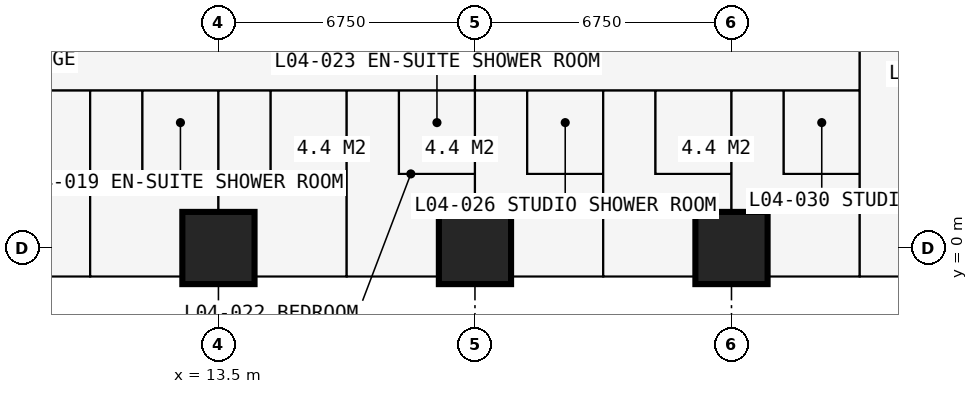
"""IFC4 building model, lengths in metres.
Left out: names, types, materials, properties, quantities, classifications, styles, units other than length and angle.
Written with IfcOpenShell. Run it as: python <this file> out.ifc"""

import sys

from ifc_helpers import new_model, si_unit, direction, frame, frame_2d, origin, origin_2d, place, context, subcontext, project, spatial, rectangle, extrude, element, fill, save


model = new_model("IFC4")
c1 = context("Model", 3, precision=1e-05, world=origin(), true_north=direction((0.0, 1.0)))
c2 = subcontext(c1, "Body", "Model", "MODEL_VIEW")
j1 = project(units=[si_unit("LENGTHUNIT", "METRE"), si_unit("PLANEANGLEUNIT", "RADIAN")], contexts=[c1])
p1 = place(None, origin())
s1 = spatial("IfcSite", under=j1, at=p1, CompositionType="ELEMENT")
p2 = place(p1, origin())
s2 = spatial("IfcBuilding", under=s1, at=p2, CompositionType="ELEMENT")
p3 = place(p2, frame((0.0, 0.0, 18.0)))
s3 = spatial("IfcBuildingStorey", under=s2, at=p3, CompositionType="ELEMENT", Elevation=18.0)
for number, where, z_axis, x_axis in (
    (1, (13.5, 0.0, 0.0), (0.0, 0.0, 1.0), (1.0, 0.0, 0.0)),
    (2, (20.25, 0.0, 0.0), (0.0, 0.0, 1.0), (1.0, 0.0, 0.0)),
    (3, (27.0, 0.0, 0.0), (0.0, 0.0, 1.0), (1.0, 0.0, 0.0)),
):
    element("IfcColumn", number, at=place(p3, frame(where, z_axis=z_axis, x_axis=x_axis)), inside=s3, PredefinedType="COLUMN", context=c2, shape_type="SweptSolid", body=[
        extrude(rectangle(XDim=1.9, YDim=1.9, at=origin_2d()), origin(), (0.0, 0.0, 1.0), 3.6),
    ])
p4 = place(p3, frame((20.25, -0.75, 0.0), z_axis=(0.0, 0.0, 1.0), x_axis=(-1.0, 0.0, 0.0)))
e4 = element("IfcWall", 4, at=p4, inside=s3, PredefinedType="SOLIDWALL", context=c2, shape_type="SweptSolid", body=[
    extrude(rectangle(XDim=6.75, YDim=0.15, at=frame_2d((3.375, 0.0))), origin(), (0.0, 0.0, 1.0), 3.375),
])
p5 = place(p4, frame((0.996, 0.0, 0.0)))
e5 = element("IfcOpeningElement", 5, at=p5, cuts=e4, PredefinedType="OPENING", context=c2, shape_type="SweptSolid", body=[
    extrude(rectangle(XDim=1.0, YDim=2.2, at=frame_2d((0.5, 1.1))), frame((0.0, 0.085, 0.0), z_axis=(0.0, -1.0, 0.0), x_axis=(1.0, 0.0, 0.0)), (0.0, 0.0, 1.0), 0.17),
])
p6 = place(p4, frame((2.042, 0.0, 0.9)))
e6 = element("IfcOpeningElement", 6, at=p6, cuts=e4, PredefinedType="OPENING", context=c2, shape_type="SweptSolid", body=[
    extrude(rectangle(XDim=1.2, YDim=1.8, at=frame_2d((0.6, 0.9))), frame((0.0, 0.085, 0.0), z_axis=(0.0, -1.0, 0.0), x_axis=(1.0, 0.0, 0.0)), (0.0, 0.0, 1.0), 0.17),
])
p7 = place(p4, frame((4.754, 0.0, 0.0)))
e7 = element("IfcOpeningElement", 7, at=p7, cuts=e4, PredefinedType="OPENING", context=c2, shape_type="SweptSolid", body=[
    extrude(rectangle(XDim=1.0, YDim=2.2, at=frame_2d((0.5, 1.1))), frame((0.0, 0.085, 0.0), z_axis=(0.0, -1.0, 0.0), x_axis=(1.0, 0.0, 0.0)), (0.0, 0.0, 1.0), 0.17),
])
p8 = place(p4, frame((3.508, 0.0, 0.9)))
e8 = element("IfcOpeningElement", 8, at=p8, cuts=e4, PredefinedType="OPENING", context=c2, shape_type="SweptSolid", body=[
    extrude(rectangle(XDim=1.2, YDim=1.8, at=frame_2d((0.6, 0.9))), frame((0.0, 0.085, 0.0), z_axis=(0.0, -1.0, 0.0), x_axis=(1.0, 0.0, 0.0)), (0.0, 0.0, 1.0), 0.17),
])
p9 = place(p3, frame((16.875, -0.85, 0.0), z_axis=(0.0, 0.0, 1.0), x_axis=(0.0, -1.0, 0.0)))
e9 = element("IfcWall", 9, at=p9, inside=s3, PredefinedType="USERDEFINED", context=c2, shape_type="SweptSolid", body=[
    extrude(rectangle(XDim=2.2, YDim=1.0, at=frame_2d((1.1, 0.0))), origin(), (0.0, 0.0, 1.0), 0.9),
])
p10 = place(p3, frame((6.75, 4.15, 0.0), z_axis=(0.0, 0.0, 1.0), x_axis=(1.0, 0.0, 0.0)))
e10 = element("IfcWall", 10, at=p10, inside=s3, PredefinedType="PARTITIONING", context=c2, shape_type="SweptSolid", body=[
    extrude(rectangle(XDim=23.625, YDim=0.1, at=frame_2d((11.812, 0.0))), origin(), (0.0, 0.0, 1.0), 3.375),
])
p11 = place(p10, frame((1.2, 0.0, 0.0)))
e11 = element("IfcOpeningElement", 11, at=p11, cuts=e10, PredefinedType="OPENING", context=c2, shape_type="SweptSolid", body=[
    extrude(rectangle(XDim=1.0, YDim=2.2, at=frame_2d((0.5, 1.1))), frame((0.0, 0.06, 0.0), z_axis=(0.0, -1.0, 0.0), x_axis=(1.0, 0.0, 0.0)), (0.0, 0.0, 1.0), 0.12),
])
p12 = place(p10, frame((3.575, 0.0, 0.0)))
e12 = element("IfcOpeningElement", 12, at=p12, cuts=e10, PredefinedType="OPENING", context=c2, shape_type="SweptSolid", body=[
    extrude(rectangle(XDim=0.95, YDim=2.2, at=frame_2d((0.475, 1.1))), frame((0.0, 0.06, 0.0), z_axis=(0.0, -1.0, 0.0), x_axis=(1.0, 0.0, 0.0)), (0.0, 0.0, 1.0), 0.12),
])
p13 = place(p10, frame((7.0, 0.0, 0.0)))
e13 = element("IfcOpeningElement", 13, at=p13, cuts=e10, PredefinedType="OPENING", context=c2, shape_type="SweptSolid", body=[
    extrude(rectangle(XDim=0.95, YDim=2.2, at=frame_2d((0.475, 1.1))), frame((0.0, 0.06, 0.0), z_axis=(0.0, -1.0, 0.0), x_axis=(1.0, 0.0, 0.0)), (0.0, 0.0, 1.0), 0.12),
])
p14 = place(p10, frame((10.375, 0.0, 0.0)))
e14 = element("IfcOpeningElement", 14, at=p14, cuts=e10, PredefinedType="OPENING", context=c2, shape_type="SweptSolid", body=[
    extrude(rectangle(XDim=0.95, YDim=2.2, at=frame_2d((0.475, 1.1))), frame((0.0, 0.06, 0.0), z_axis=(0.0, -1.0, 0.0), x_axis=(1.0, 0.0, 0.0)), (0.0, 0.0, 1.0), 0.12),
])
p15 = place(p10, frame((13.7, 0.0, 0.0)))
e15 = element("IfcOpeningElement", 15, at=p15, cuts=e10, PredefinedType="OPENING", context=c2, shape_type="SweptSolid", body=[
    extrude(rectangle(XDim=0.95, YDim=2.2, at=frame_2d((0.475, 1.1))), frame((0.0, 0.06, 0.0), z_axis=(0.0, -1.0, 0.0), x_axis=(1.0, 0.0, 0.0)), (0.0, 0.0, 1.0), 0.12),
])
p16 = place(p10, frame((17.125, 0.0, 0.0)))
e16 = element("IfcOpeningElement", 16, at=p16, cuts=e10, PredefinedType="OPENING", context=c2, shape_type="SweptSolid", body=[
    extrude(rectangle(XDim=0.95, YDim=2.2, at=frame_2d((0.475, 1.1))), frame((0.0, 0.06, 0.0), z_axis=(0.0, -1.0, 0.0), x_axis=(1.0, 0.0, 0.0)), (0.0, 0.0, 1.0), 0.12),
])
p17 = place(p10, frame((20.5, 0.0, 0.0)))
e17 = element("IfcOpeningElement", 17, at=p17, cuts=e10, PredefinedType="OPENING", context=c2, shape_type="SweptSolid", body=[
    extrude(rectangle(XDim=0.95, YDim=2.2, at=frame_2d((0.475, 1.1))), frame((0.0, 0.06, 0.0), z_axis=(0.0, -1.0, 0.0), x_axis=(1.0, 0.0, 0.0)), (0.0, 0.0, 1.0), 0.12),
])
p18 = place(p3, frame((10.125, -0.734, 0.0), z_axis=(0.0, 0.0, 1.0), x_axis=(0.0, 1.0, 0.0)))
e18 = element("IfcWall", 18, at=p18, inside=s3, PredefinedType="PARTITIONING", context=c2, shape_type="SweptSolid", body=[
    extrude(rectangle(XDim=4.884, YDim=0.15, at=frame_2d((2.442, 0.0))), origin(), (0.0, 0.0, 1.0), 3.375),
])
p19 = place(p3, frame((11.5, 1.95, 0.0), z_axis=(0.0, 0.0, 1.0), x_axis=(0.0, 1.0, 0.0)))
e19 = element("IfcWall", 19, at=p19, inside=s3, PredefinedType="PARTITIONING", context=c2, shape_type="SweptSolid", body=[
    extrude(rectangle(XDim=2.2, YDim=0.1, at=frame_2d((1.1, 0.0))), origin(), (0.0, 0.0, 1.0), 3.375),
])
p20 = place(p19, frame((0.65, 0.0, 0.0)))
e20 = element("IfcOpeningElement", 20, at=p20, cuts=e19, PredefinedType="OPENING", context=c2, shape_type="SweptSolid", body=[
    extrude(rectangle(XDim=0.9, YDim=2.2, at=frame_2d((0.45, 1.1))), frame((0.0, 0.06, 0.0), z_axis=(0.0, -1.0, 0.0), x_axis=(1.0, 0.0, 0.0)), (0.0, 0.0, 1.0), 0.12),
])
p21 = place(p3, frame((11.5, 1.95, 0.0), z_axis=(0.0, 0.0, 1.0), x_axis=(1.0, 0.0, 0.0)))
e21 = element("IfcWall", 21, at=p21, inside=s3, PredefinedType="PARTITIONING", context=c2, shape_type="SweptSolid", body=[
    extrude(rectangle(XDim=2.0, YDim=0.1, at=frame_2d((1.0, 0.0))), origin(), (0.0, 0.0, 1.0), 3.375),
])
p22 = place(p3, frame((13.5, -0.734, 0.0), z_axis=(0.0, 0.0, 1.0), x_axis=(0.0, 1.0, 0.0)))
e22 = element("IfcWall", 22, at=p22, inside=s3, PredefinedType="PARTITIONING", context=c2, shape_type="SweptSolid", body=[
    extrude(rectangle(XDim=4.884, YDim=0.175, at=frame_2d((2.442, 0.0))), origin(), (0.0, 0.0, 1.0), 2.877),
])
p23 = place(p3, frame((14.875, 1.95, 0.0), z_axis=(0.0, 0.0, 1.0), x_axis=(0.0, 1.0, 0.0)))
e23 = element("IfcWall", 23, at=p23, inside=s3, PredefinedType="PARTITIONING", context=c2, shape_type="SweptSolid", body=[
    extrude(rectangle(XDim=2.2, YDim=0.1, at=frame_2d((1.1, 0.0))), origin(), (0.0, 0.0, 1.0), 3.375),
])
p24 = place(p23, frame((0.65, 0.0, 0.0)))
e24 = element("IfcOpeningElement", 24, at=p24, cuts=e23, PredefinedType="OPENING", context=c2, shape_type="SweptSolid", body=[
    extrude(rectangle(XDim=0.9, YDim=2.2, at=frame_2d((0.45, 1.1))), frame((0.0, 0.06, 0.0), z_axis=(0.0, -1.0, 0.0), x_axis=(1.0, 0.0, 0.0)), (0.0, 0.0, 1.0), 0.12),
])
p25 = place(p3, frame((14.875, 1.95, 0.0), z_axis=(0.0, 0.0, 1.0), x_axis=(1.0, 0.0, 0.0)))
e25 = element("IfcWall", 25, at=p25, inside=s3, PredefinedType="PARTITIONING", context=c2, shape_type="SweptSolid", body=[
    extrude(rectangle(XDim=2.0, YDim=0.1, at=frame_2d((1.0, 0.0))), origin(), (0.0, 0.0, 1.0), 3.375),
])
p26 = place(p3, frame((16.875, -0.734, 0.0), z_axis=(0.0, 0.0, 1.0), x_axis=(0.0, 1.0, 0.0)))
e26 = element("IfcWall", 26, at=p26, inside=s3, PredefinedType="PARTITIONING", context=c2, shape_type="SweptSolid", body=[
    extrude(rectangle(XDim=4.884, YDim=0.175, at=frame_2d((2.442, 0.0))), origin(), (0.0, 0.0, 1.0), 3.375),
])
p27 = place(p3, frame((18.25, 1.95, 0.0), z_axis=(0.0, 0.0, 1.0), x_axis=(0.0, 1.0, 0.0)))
e27 = element("IfcWall", 27, at=p27, inside=s3, PredefinedType="PARTITIONING", context=c2, shape_type="SweptSolid", body=[
    extrude(rectangle(XDim=2.2, YDim=0.1, at=frame_2d((1.1, 0.0))), origin(), (0.0, 0.0, 1.0), 3.375),
])
p28 = place(p27, frame((0.65, 0.0, 0.0)))
e28 = element("IfcOpeningElement", 28, at=p28, cuts=e27, PredefinedType="OPENING", context=c2, shape_type="SweptSolid", body=[
    extrude(rectangle(XDim=0.9, YDim=2.2, at=frame_2d((0.45, 1.1))), frame((0.0, 0.06, 0.0), z_axis=(0.0, -1.0, 0.0), x_axis=(1.0, 0.0, 0.0)), (0.0, 0.0, 1.0), 0.12),
])
p29 = place(p3, frame((18.25, 1.95, 0.0), z_axis=(0.0, 0.0, 1.0), x_axis=(1.0, 0.0, 0.0)))
e29 = element("IfcWall", 29, at=p29, inside=s3, PredefinedType="PARTITIONING", context=c2, shape_type="SweptSolid", body=[
    extrude(rectangle(XDim=2.0, YDim=0.1, at=frame_2d((1.0, 0.0))), origin(), (0.0, 0.0, 1.0), 3.375),
])
p30 = place(p3, frame((20.25, -0.734, 0.0), z_axis=(0.0, 0.0, 1.0), x_axis=(0.0, 1.0, 0.0)))
e30 = element("IfcWall", 30, at=p30, inside=s3, PredefinedType="PARTITIONING", context=c2, shape_type="SweptSolid", body=[
    extrude(rectangle(XDim=12.034, YDim=0.15, at=frame_2d((6.017, 0.0))), origin(), (0.0, 0.0, 1.0), 2.61),
])
p31 = place(p3, frame((21.625, 1.95, 0.0), z_axis=(0.0, 0.0, 1.0), x_axis=(0.0, 1.0, 0.0)))
e31 = element("IfcWall", 31, at=p31, inside=s3, PredefinedType="PARTITIONING", context=c2, shape_type="SweptSolid", body=[
    extrude(rectangle(XDim=2.2, YDim=0.1, at=frame_2d((1.1, 0.0))), origin(), (0.0, 0.0, 1.0), 3.375),
])
p32 = place(p31, frame((0.65, 0.0, 0.0)))
e32 = element("IfcOpeningElement", 32, at=p32, cuts=e31, PredefinedType="OPENING", context=c2, shape_type="SweptSolid", body=[
    extrude(rectangle(XDim=0.9, YDim=2.2, at=frame_2d((0.45, 1.1))), frame((0.0, 0.06, 0.0), z_axis=(0.0, -1.0, 0.0), x_axis=(1.0, 0.0, 0.0)), (0.0, 0.0, 1.0), 0.12),
])
p33 = place(p3, frame((21.625, 1.95, 0.0), z_axis=(0.0, 0.0, 1.0), x_axis=(1.0, 0.0, 0.0)))
e33 = element("IfcWall", 33, at=p33, inside=s3, PredefinedType="PARTITIONING", context=c2, shape_type="SweptSolid", body=[
    extrude(rectangle(XDim=2.0, YDim=0.1, at=frame_2d((1.0, 0.0))), origin(), (0.0, 0.0, 1.0), 3.375),
])
p34 = place(p3, frame((23.625, -0.734, 0.0), z_axis=(0.0, 0.0, 1.0), x_axis=(0.0, 1.0, 0.0)))
e34 = element("IfcWall", 34, at=p34, inside=s3, PredefinedType="PARTITIONING", context=c2, shape_type="SweptSolid", body=[
    extrude(rectangle(XDim=4.884, YDim=0.175, at=frame_2d((2.442, 0.0))), origin(), (0.0, 0.0, 1.0), 3.375),
])
p35 = place(p3, frame((25.0, 1.95, 0.0), z_axis=(0.0, 0.0, 1.0), x_axis=(0.0, 1.0, 0.0)))
e35 = element("IfcWall", 35, at=p35, inside=s3, PredefinedType="PARTITIONING", context=c2, shape_type="SweptSolid", body=[
    extrude(rectangle(XDim=2.2, YDim=0.1, at=frame_2d((1.1, 0.0))), origin(), (0.0, 0.0, 1.0), 3.375),
])
p36 = place(p35, frame((0.65, 0.0, 0.0)))
e36 = element("IfcOpeningElement", 36, at=p36, cuts=e35, PredefinedType="OPENING", context=c2, shape_type="SweptSolid", body=[
    extrude(rectangle(XDim=0.9, YDim=2.2, at=frame_2d((0.45, 1.1))), frame((0.0, 0.06, 0.0), z_axis=(0.0, -1.0, 0.0), x_axis=(1.0, 0.0, 0.0)), (0.0, 0.0, 1.0), 0.12),
])
p37 = place(p3, frame((25.0, 1.95, 0.0), z_axis=(0.0, 0.0, 1.0), x_axis=(1.0, 0.0, 0.0)))
e37 = element("IfcWall", 37, at=p37, inside=s3, PredefinedType="PARTITIONING", context=c2, shape_type="SweptSolid", body=[
    extrude(rectangle(XDim=2.0, YDim=0.1, at=frame_2d((1.0, 0.0))), origin(), (0.0, 0.0, 1.0), 3.375),
])
p38 = place(p3, frame((27.0, -0.734, 0.0), z_axis=(0.0, 0.0, 1.0), x_axis=(0.0, 1.0, 0.0)))
e38 = element("IfcWall", 38, at=p38, inside=s3, PredefinedType="PARTITIONING", context=c2, shape_type="SweptSolid", body=[
    extrude(rectangle(XDim=4.884, YDim=0.175, at=frame_2d((2.442, 0.0))), origin(), (0.0, 0.0, 1.0), 2.61),
])
p39 = place(p3, frame((28.375, 1.95, 0.0), z_axis=(0.0, 0.0, 1.0), x_axis=(0.0, 1.0, 0.0)))
e39 = element("IfcWall", 39, at=p39, inside=s3, PredefinedType="PARTITIONING", context=c2, shape_type="SweptSolid", body=[
    extrude(rectangle(XDim=2.2, YDim=0.1, at=frame_2d((1.1, 0.0))), origin(), (0.0, 0.0, 1.0), 3.375),
])
p40 = place(p39, frame((0.65, 0.0, 0.0)))
e40 = element("IfcOpeningElement", 40, at=p40, cuts=e39, PredefinedType="OPENING", context=c2, shape_type="SweptSolid", body=[
    extrude(rectangle(XDim=0.9, YDim=2.2, at=frame_2d((0.45, 1.1))), frame((0.0, 0.06, 0.0), z_axis=(0.0, -1.0, 0.0), x_axis=(1.0, 0.0, 0.0)), (0.0, 0.0, 1.0), 0.12),
])
p41 = place(p3, frame((28.375, 1.95, 0.0), z_axis=(0.0, 0.0, 1.0), x_axis=(1.0, 0.0, 0.0)))
e41 = element("IfcWall", 41, at=p41, inside=s3, PredefinedType="PARTITIONING", context=c2, shape_type="SweptSolid", body=[
    extrude(rectangle(XDim=2.0, YDim=0.1, at=frame_2d((1.0, 0.0))), origin(), (0.0, 0.0, 1.0), 3.375),
])
p42 = place(p3, frame((30.375, -0.734, 0.0), z_axis=(0.0, 0.0, 1.0), x_axis=(0.0, 1.0, 0.0)))
e42 = element("IfcWall", 42, at=p42, inside=s3, PredefinedType="PARTITIONING", context=c2, shape_type="SweptSolid", body=[
    extrude(rectangle(XDim=12.034, YDim=0.15, at=frame_2d((6.017, 0.0))), origin(), (0.0, 0.0, 1.0), 3.375),
])
p43 = place(p42, frame((5.134, 0.0, 0.0)))
e43 = element("IfcOpeningElement", 43, at=p43, cuts=e42, PredefinedType="OPENING", context=c2, shape_type="SweptSolid", body=[
    extrude(rectangle(XDim=1.0, YDim=2.2, at=frame_2d((0.5, 1.1))), frame((0.0, 0.085, 0.0), z_axis=(0.0, -1.0, 0.0), x_axis=(1.0, 0.0, 0.0)), (0.0, 0.0, 1.0), 0.17),
])
p44 = place(p5, origin())
e44 = element("IfcDoor", 44, at=p44, inside=s3, OperationType="SINGLE_SWING_LEFT", PredefinedType="DOOR", context=c2, shape_type="SweptSolid", body=[
    extrude(rectangle(XDim=1.0, YDim=2.2, at=frame_2d((0.5, 1.1))), frame((0.0, 0.025, 0.0), z_axis=(0.0, -1.0, 0.0), x_axis=(1.0, 0.0, 0.0)), (0.0, 0.0, 1.0), 0.05),
])
fill(e5, e44)
p45 = place(p6, origin())
e45 = element("IfcWindow", 45, at=p45, inside=s3, PartitioningType="SINGLE_PANEL", PredefinedType="WINDOW", context=c2, shape_type="SweptSolid", body=[
    extrude(rectangle(XDim=1.2, YDim=1.8, at=frame_2d((0.6, 0.9))), frame((0.0, 0.03, 0.0), z_axis=(0.0, -1.0, 0.0), x_axis=(1.0, 0.0, 0.0)), (0.0, 0.0, 1.0), 0.06),
])
fill(e6, e45)
p46 = place(p7, origin())
e46 = element("IfcDoor", 46, at=p46, inside=s3, OperationType="SINGLE_SWING_RIGHT", PredefinedType="DOOR", context=c2, shape_type="SweptSolid", body=[
    extrude(rectangle(XDim=1.0, YDim=2.2, at=frame_2d((0.5, 1.1))), frame((0.0, 0.025, 0.0), z_axis=(0.0, -1.0, 0.0), x_axis=(1.0, 0.0, 0.0)), (0.0, 0.0, 1.0), 0.05),
])
fill(e7, e46)
p47 = place(p8, origin())
e47 = element("IfcWindow", 47, at=p47, inside=s3, PartitioningType="SINGLE_PANEL", PredefinedType="WINDOW", context=c2, shape_type="SweptSolid", body=[
    extrude(rectangle(XDim=1.2, YDim=1.8, at=frame_2d((0.6, 0.9))), frame((0.0, 0.03, 0.0), z_axis=(0.0, -1.0, 0.0), x_axis=(1.0, 0.0, 0.0)), (0.0, 0.0, 1.0), 0.06),
])
fill(e8, e47)
p48 = place(p12, origin())
e48 = element("IfcDoor", 48, at=p48, inside=s3, OperationType="SINGLE_SWING_LEFT", PredefinedType="DOOR", context=c2, shape_type="SweptSolid", body=[
    extrude(rectangle(XDim=0.95, YDim=2.2, at=frame_2d((0.475, 1.1))), frame((0.0, 0.025, 0.0), z_axis=(0.0, -1.0, 0.0), x_axis=(1.0, 0.0, 0.0)), (0.0, 0.0, 1.0), 0.05),
])
fill(e12, e48)
p49 = place(p20, origin())
e49 = element("IfcDoor", 49, at=p49, inside=s3, OperationType="SINGLE_SWING_RIGHT", PredefinedType="DOOR", context=c2, shape_type="SweptSolid", body=[
    extrude(rectangle(XDim=0.9, YDim=2.2, at=frame_2d((0.45, 1.1))), frame((0.0, 0.025, 0.0), z_axis=(0.0, -1.0, 0.0), x_axis=(1.0, 0.0, 0.0)), (0.0, 0.0, 1.0), 0.05),
])
fill(e20, e49)
p50 = place(p13, origin())
e50 = element("IfcDoor", 50, at=p50, inside=s3, OperationType="SINGLE_SWING_LEFT", PredefinedType="DOOR", context=c2, shape_type="SweptSolid", body=[
    extrude(rectangle(XDim=0.95, YDim=2.2, at=frame_2d((0.475, 1.1))), frame((0.0, 0.025, 0.0), z_axis=(0.0, -1.0, 0.0), x_axis=(1.0, 0.0, 0.0)), (0.0, 0.0, 1.0), 0.05),
])
fill(e13, e50)
p51 = place(p24, origin())
e51 = element("IfcDoor", 51, at=p51, inside=s3, OperationType="SINGLE_SWING_RIGHT", PredefinedType="DOOR", context=c2, shape_type="SweptSolid", body=[
    extrude(rectangle(XDim=0.9, YDim=2.2, at=frame_2d((0.45, 1.1))), frame((0.0, 0.025, 0.0), z_axis=(0.0, -1.0, 0.0), x_axis=(1.0, 0.0, 0.0)), (0.0, 0.0, 1.0), 0.05),
])
fill(e24, e51)
p52 = place(p14, origin())
e52 = element("IfcDoor", 52, at=p52, inside=s3, OperationType="SINGLE_SWING_LEFT", PredefinedType="DOOR", context=c2, shape_type="SweptSolid", body=[
    extrude(rectangle(XDim=0.95, YDim=2.2, at=frame_2d((0.475, 1.1))), frame((0.0, 0.025, 0.0), z_axis=(0.0, -1.0, 0.0), x_axis=(1.0, 0.0, 0.0)), (0.0, 0.0, 1.0), 0.05),
])
fill(e14, e52)
p53 = place(p28, origin())
e53 = element("IfcDoor", 53, at=p53, inside=s3, OperationType="SINGLE_SWING_RIGHT", PredefinedType="DOOR", context=c2, shape_type="SweptSolid", body=[
    extrude(rectangle(XDim=0.9, YDim=2.2, at=frame_2d((0.45, 1.1))), frame((0.0, 0.025, 0.0), z_axis=(0.0, -1.0, 0.0), x_axis=(1.0, 0.0, 0.0)), (0.0, 0.0, 1.0), 0.05),
])
fill(e28, e53)
p54 = place(p15, origin())
e54 = element("IfcDoor", 54, at=p54, inside=s3, OperationType="SINGLE_SWING_LEFT", PredefinedType="DOOR", context=c2, shape_type="SweptSolid", body=[
    extrude(rectangle(XDim=0.95, YDim=2.2, at=frame_2d((0.475, 1.1))), frame((0.0, 0.025, 0.0), z_axis=(0.0, -1.0, 0.0), x_axis=(1.0, 0.0, 0.0)), (0.0, 0.0, 1.0), 0.05),
])
fill(e15, e54)
p55 = place(p32, origin())
e55 = element("IfcDoor", 55, at=p55, inside=s3, OperationType="SINGLE_SWING_RIGHT", PredefinedType="DOOR", context=c2, shape_type="SweptSolid", body=[
    extrude(rectangle(XDim=0.9, YDim=2.2, at=frame_2d((0.45, 1.1))), frame((0.0, 0.025, 0.0), z_axis=(0.0, -1.0, 0.0), x_axis=(1.0, 0.0, 0.0)), (0.0, 0.0, 1.0), 0.05),
])
fill(e32, e55)
p56 = place(p16, origin())
e56 = element("IfcDoor", 56, at=p56, inside=s3, OperationType="SINGLE_SWING_LEFT", PredefinedType="DOOR", context=c2, shape_type="SweptSolid", body=[
    extrude(rectangle(XDim=0.95, YDim=2.2, at=frame_2d((0.475, 1.1))), frame((0.0, 0.025, 0.0), z_axis=(0.0, -1.0, 0.0), x_axis=(1.0, 0.0, 0.0)), (0.0, 0.0, 1.0), 0.05),
])
fill(e16, e56)
p57 = place(p36, origin())
e57 = element("IfcDoor", 57, at=p57, inside=s3, OperationType="SINGLE_SWING_RIGHT", PredefinedType="DOOR", context=c2, shape_type="SweptSolid", body=[
    extrude(rectangle(XDim=0.9, YDim=2.2, at=frame_2d((0.45, 1.1))), frame((0.0, 0.025, 0.0), z_axis=(0.0, -1.0, 0.0), x_axis=(1.0, 0.0, 0.0)), (0.0, 0.0, 1.0), 0.05),
])
fill(e36, e57)
p58 = place(p17, origin())
e58 = element("IfcDoor", 58, at=p58, inside=s3, OperationType="SINGLE_SWING_LEFT", PredefinedType="DOOR", context=c2, shape_type="SweptSolid", body=[
    extrude(rectangle(XDim=0.95, YDim=2.2, at=frame_2d((0.475, 1.1))), frame((0.0, 0.025, 0.0), z_axis=(0.0, -1.0, 0.0), x_axis=(1.0, 0.0, 0.0)), (0.0, 0.0, 1.0), 0.05),
])
fill(e17, e58)
p59 = place(p40, origin())
e59 = element("IfcDoor", 59, at=p59, inside=s3, OperationType="SINGLE_SWING_RIGHT", PredefinedType="DOOR", context=c2, shape_type="SweptSolid", body=[
    extrude(rectangle(XDim=0.9, YDim=2.2, at=frame_2d((0.45, 1.1))), frame((0.0, 0.025, 0.0), z_axis=(0.0, -1.0, 0.0), x_axis=(1.0, 0.0, 0.0)), (0.0, 0.0, 1.0), 0.05),
])
fill(e40, e59)
p60 = place(p43, origin())
e60 = element("IfcDoor", 60, at=p60, inside=s3, OperationType="SINGLE_SWING_LEFT", PredefinedType="DOOR", context=c2, shape_type="SweptSolid", body=[
    extrude(rectangle(XDim=1.0, YDim=2.2, at=frame_2d((0.5, 1.1))), frame((0.0, 0.025, 0.0), z_axis=(0.0, -1.0, 0.0), x_axis=(1.0, 0.0, 0.0)), (0.0, 0.0, 1.0), 0.05),
])
fill(e43, e60)
save(model, sys.argv[1])
